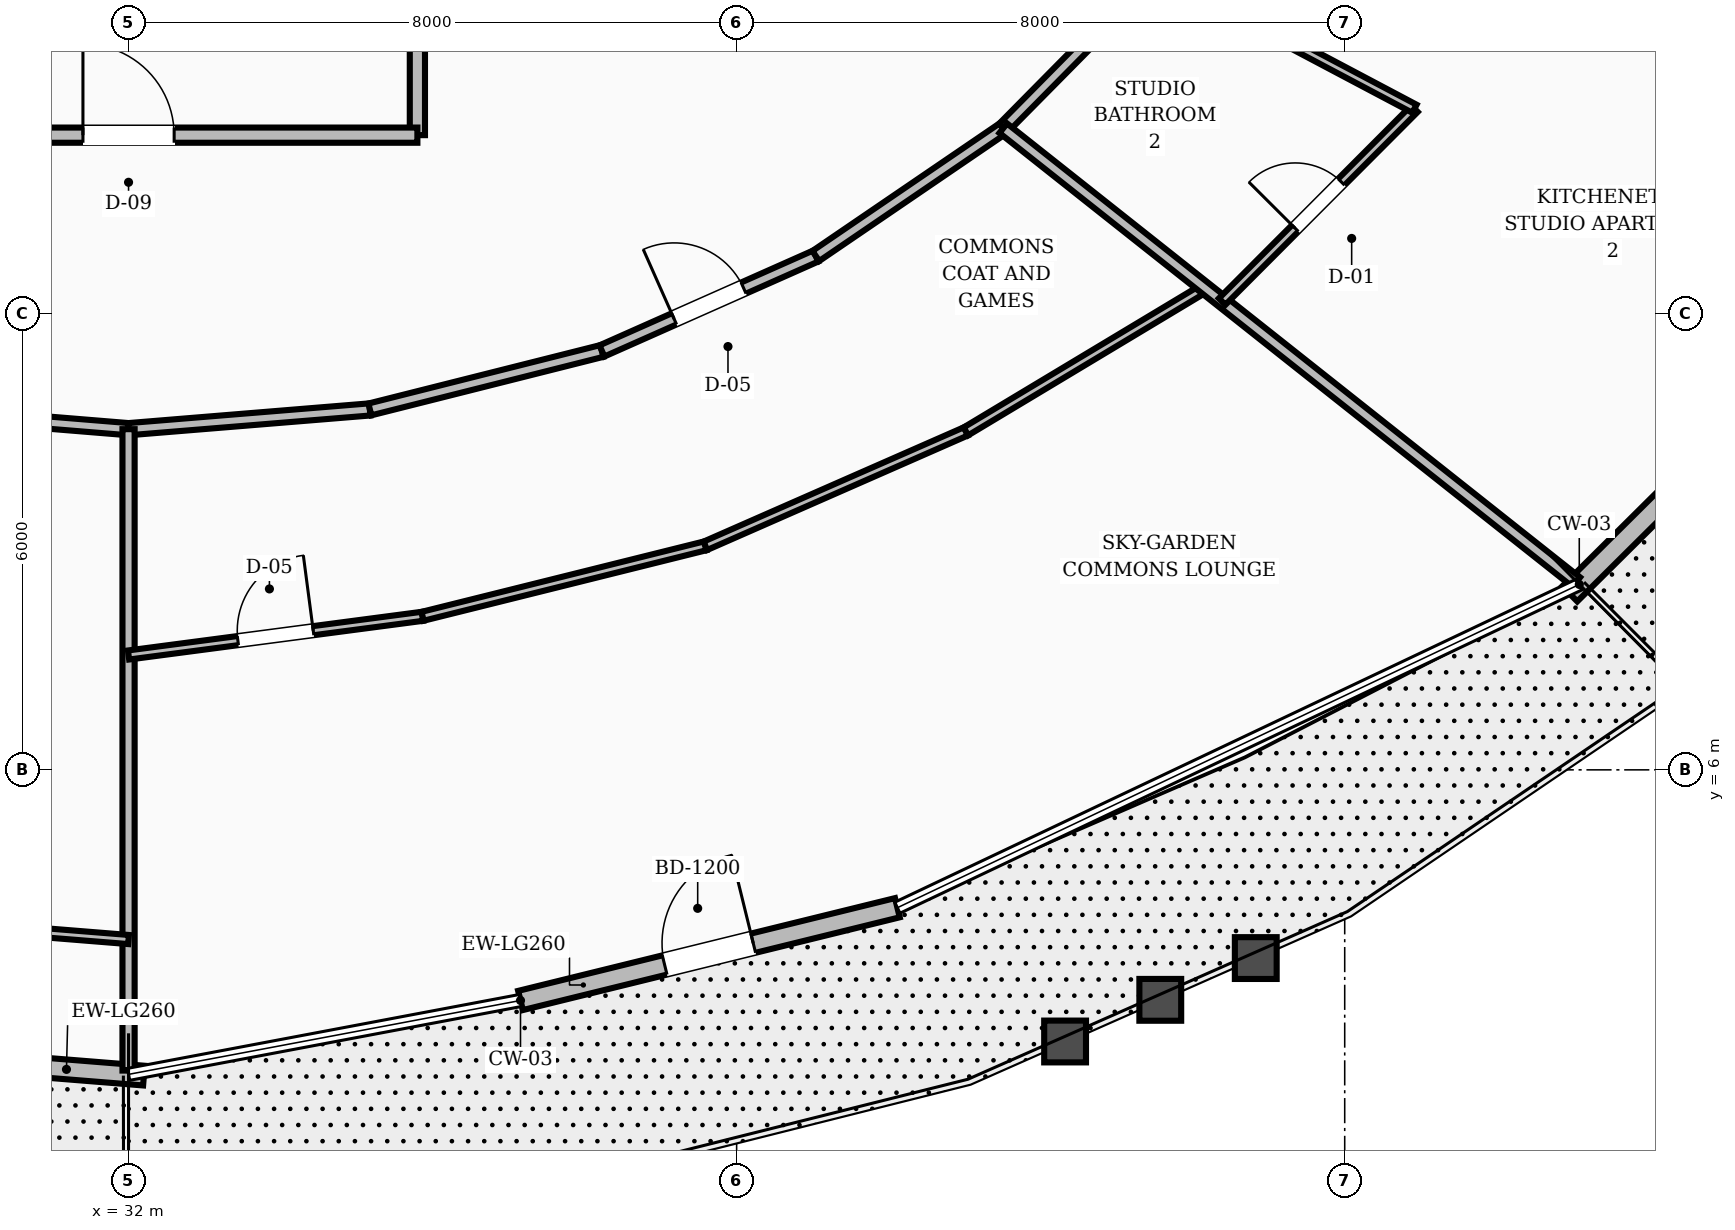
"""IFC4 building model, lengths in metres.
Left out: names, types, materials, properties, quantities, classifications, styles, units other than length and angle.
Written with IfcOpenShell. Run it as: python <this file> out.ifc"""

import sys

from ifc_helpers import new_model, si_unit, direction, frame, frame_2d, origin, place, context, subcontext, project, spatial, rectangle, extrude, element, fill, save


model = new_model("IFC4")
c1 = context("Model", 3, precision=1e-05, world=origin(), true_north=direction((0.0, 1.0)))
c2 = subcontext(c1, "Body", "Model", "MODEL_VIEW")
j1 = project(units=[si_unit("LENGTHUNIT", "METRE"), si_unit("PLANEANGLEUNIT", "RADIAN")], contexts=[c1])
p1 = place(None, origin())
s1 = spatial("IfcSite", under=j1, at=p1, CompositionType="ELEMENT")
p2 = place(p1, origin())
s2 = spatial("IfcBuilding", under=s1, at=p2, CompositionType="ELEMENT")
p3 = place(p2, frame((0.0, 0.0, 88.0)))
s3 = spatial("IfcBuildingStorey", under=s2, at=p3, CompositionType="ELEMENT", Elevation=88.0)
p4 = place(p3, frame((26.734, 2.417, 0.0), z_axis=(0.0, 0.0, 1.0), x_axis=(0.996792879397, -0.080024718573, 0.0)))
e1 = element("IfcWall", 1, at=p4, inside=s3, PredefinedType="STANDARD", context=c2, shape_type="SweptSolid", body=[
    extrude(rectangle(XDim=5.485, YDim=0.26, at=frame_2d((2.743, 0.0))), origin(), (0.0, 0.0, 1.0), 2.71),
])
p5 = place(p4, frame((2.091, 0.0, 0.0)))
e2 = element("IfcOpeningElement", 2, at=p5, cuts=e1, PredefinedType="OPENING", context=c2, shape_type="SweptSolid", body=[
    extrude(rectangle(XDim=1.1, YDim=2.15, at=frame_2d((0.55, 1.075))), frame((0.0, 0.14, 0.0), z_axis=(0.0, -1.0, 0.0), x_axis=(1.0, 0.0, 0.0)), (0.0, 0.0, 1.0), 0.28),
])
p6 = place(p3, frame((37.156, 2.966, 0.0), z_axis=(0.0, 0.0, 1.0), x_axis=(0.971019146569, 0.239001709192, 0.0)))
e3 = element("IfcWall", 3, at=p6, inside=s3, PredefinedType="STANDARD", context=c2, shape_type="SweptSolid", body=[
    extrude(rectangle(XDim=5.106, YDim=0.26, at=frame_2d((2.553, 0.0))), origin(), (0.0, 0.0, 1.0), 2.71),
])
p7 = place(p6, frame((1.953, 0.0, 0.0)))
e4 = element("IfcOpeningElement", 4, at=p7, cuts=e3, PredefinedType="OPENING", context=c2, shape_type="SweptSolid", body=[
    extrude(rectangle(XDim=1.2, YDim=2.15, at=frame_2d((0.6, 1.075))), frame((0.0, 0.14, 0.0), z_axis=(0.0, -1.0, 0.0), x_axis=(1.0, 0.0, 0.0)), (0.0, 0.0, 1.0), 0.28),
])
p8 = place(p3, frame((50.961, 8.315, 0.0), z_axis=(0.0, 0.0, 1.0), x_axis=(0.709441021492, 0.704764809724, 0.0)))
e5 = element("IfcWall", 5, at=p8, inside=s3, PredefinedType="STANDARD", context=c2, shape_type="SweptSolid", body=[
    extrude(rectangle(XDim=4.908, YDim=0.28, at=frame_2d((2.454, 0.0))), origin(), (0.0, 0.0, 1.0), 2.71),
])
p9 = place(p3, frame((35.8, 14.35, 0.0), z_axis=(0.0, 0.0, 1.0), x_axis=(0.0, 1.0, 0.0)))
e6 = element("IfcWall", 6, at=p9, inside=s3, PredefinedType="SOLIDWALL", context=c2, shape_type="SweptSolid", body=[
    extrude(rectangle(XDim=2.2, YDim=0.2, at=frame_2d((1.1, 0.0))), origin(), (0.0, 0.0, 1.0), 2.71),
])
p10 = place(p3, frame((28.2, 14.35, 0.0), z_axis=(0.0, 0.0, 1.0), x_axis=(1.0, 0.0, 0.0)))
e7 = element("IfcWall", 7, at=p10, inside=s3, PredefinedType="SOLIDWALL", context=c2, shape_type="SweptSolid", body=[
    extrude(rectangle(XDim=7.6, YDim=0.2, at=frame_2d((3.8, 0.0))), origin(), (0.0, 0.0, 1.0), 2.71),
])
p11 = place(p10, frame((3.2, 0.0, 0.0)))
e8 = element("IfcOpeningElement", 8, at=p11, cuts=e7, PredefinedType="OPENING", context=c2, shape_type="SweptSolid", body=[
    extrude(rectangle(XDim=1.2, YDim=2.1, at=frame_2d((0.6, 1.05))), frame((0.0, 0.11, 0.0), z_axis=(0.0, -1.0, 0.0), x_axis=(1.0, 0.0, 0.0)), (0.0, 0.0, 1.0), 0.22),
])
p12 = place(p3, frame((28.825, 10.742, 0.0), z_axis=(0.0, 0.0, 1.0), x_axis=(0.996669377538, -0.081548463373, 0.0)))
e9 = element("IfcWall", 9, at=p12, inside=s3, PredefinedType="SOLIDWALL", context=c2, shape_type="SweptSolid", body=[
    extrude(rectangle(XDim=3.185, YDim=0.16, at=frame_2d((1.593, 0.0))), origin(), (0.0, 0.0, 1.0), 2.71),
])
p13 = place(p12, frame((1.118, 0.0, 0.0)))
e10 = element("IfcOpeningElement", 10, at=p13, cuts=e9, PredefinedType="OPENING", context=c2, shape_type="SweptSolid", body=[
    extrude(rectangle(XDim=0.95, YDim=2.1, at=frame_2d((0.475, 1.05))), frame((0.0, 0.09, 0.0), z_axis=(0.0, -1.0, 0.0), x_axis=(1.0, 0.0, 0.0)), (0.0, 0.0, 1.0), 0.18),
])
p14 = place(p3, frame((32.0, 10.482, 0.0), z_axis=(0.0, 0.0, 1.0), x_axis=(0.996669377538, 0.081548463373, 0.0)))
e11 = element("IfcWall", 11, at=p14, inside=s3, PredefinedType="SOLIDWALL", context=c2, shape_type="SweptSolid", body=[
    extrude(rectangle(XDim=3.185, YDim=0.16, at=frame_2d((1.593, 0.0))), origin(), (0.0, 0.0, 1.0), 2.71),
])
p15 = place(p3, frame((35.175, 10.742, 0.0), z_axis=(0.0, 0.0, 1.0), x_axis=(0.969689238064, 0.244341526521, 0.0)))
e12 = element("IfcWall", 12, at=p15, inside=s3, PredefinedType="SOLIDWALL", context=c2, shape_type="SweptSolid", body=[
    extrude(rectangle(XDim=3.148, YDim=0.16, at=frame_2d((1.574, 0.0))), origin(), (0.0, 0.0, 1.0), 2.71),
])
p16 = place(p3, frame((38.228, 11.511, 0.0), z_axis=(0.0, 0.0, 1.0), x_axis=(0.913952123493, 0.405822024984, 0.0)))
e13 = element("IfcWall", 13, at=p16, inside=s3, PredefinedType="SOLIDWALL", context=c2, shape_type="SweptSolid", body=[
    extrude(rectangle(XDim=3.078, YDim=0.16, at=frame_2d((1.539, 0.0))), origin(), (0.0, 0.0, 1.0), 2.71),
])
p17 = place(p16, frame((1.039, 0.0, 0.0)))
e14 = element("IfcOpeningElement", 14, at=p17, cuts=e13, PredefinedType="OPENING", context=c2, shape_type="SweptSolid", body=[
    extrude(rectangle(XDim=1.0, YDim=2.1, at=frame_2d((0.5, 1.05))), frame((0.0, 0.09, 0.0), z_axis=(0.0, -1.0, 0.0), x_axis=(1.0, 0.0, 0.0)), (0.0, 0.0, 1.0), 0.18),
])
p18 = place(p3, frame((41.041, 12.76, 0.0), z_axis=(0.0, 0.0, 1.0), x_axis=(0.826293096206, 0.56324037423, 0.0)))
e15 = element("IfcWall", 15, at=p18, inside=s3, PredefinedType="SOLIDWALL", context=c2, shape_type="SweptSolid", body=[
    extrude(rectangle(XDim=2.985, YDim=0.16, at=frame_2d((1.492, 0.0))), origin(), (0.0, 0.0, 1.0), 2.71),
])
p19 = place(p3, frame((43.508, 14.441, 0.0), z_axis=(0.0, 0.0, 1.0), x_axis=(0.702811997, 0.711375636969, 0.0)))
e16 = element("IfcWall", 16, at=p19, inside=s3, PredefinedType="SOLIDWALL", context=c2, shape_type="SweptSolid", body=[
    extrude(rectangle(XDim=2.879, YDim=0.16, at=frame_2d((1.44, 0.0))), origin(), (0.0, 0.0, 1.0), 2.71),
])
p20 = place(p3, frame((32.0, 10.482, 0.0), z_axis=(0.0, 0.0, 1.0), x_axis=(0.0, -1.0, 0.0)))
e17 = element("IfcWall", 17, at=p20, inside=s3, PredefinedType="SOLIDWALL", context=c2, shape_type="SweptSolid", body=[
    extrude(rectangle(XDim=8.438, YDim=0.16, at=frame_2d((4.219, 0.0))), origin(), (0.0, 0.0, 1.0), 2.71),
])
p21 = place(p3, frame((32.0, 7.511, 0.0), z_axis=(0.0, 0.0, 1.0), x_axis=(0.991445135258, 0.130524111843, 0.0)))
e18 = element("IfcWall", 18, at=p21, inside=s3, PredefinedType="PARTITIONING", context=c2, shape_type="SweptSolid", body=[
    extrude(rectangle(XDim=3.902, YDim=0.12, at=frame_2d((1.951, 0.0))), origin(), (0.0, 0.0, 1.0), 2.71),
])
p22 = place(p21, frame((1.451, 0.0, 0.0)))
e19 = element("IfcOpeningElement", 19, at=p22, cuts=e18, PredefinedType="OPENING", context=c2, shape_type="SweptSolid", body=[
    extrude(rectangle(XDim=1.0, YDim=2.1, at=frame_2d((0.5, 1.05))), frame((0.0, 0.07, 0.0), z_axis=(0.0, -1.0, 0.0), x_axis=(1.0, 0.0, 0.0)), (0.0, 0.0, 1.0), 0.14),
])
p23 = place(p3, frame((35.868, 8.02, 0.0), z_axis=(0.0, 0.0, 1.0), x_axis=(0.970310833778, 0.241861294657, 0.0)))
e20 = element("IfcWall", 20, at=p23, inside=s3, PredefinedType="PARTITIONING", context=c2, shape_type="SweptSolid", body=[
    extrude(rectangle(XDim=3.834, YDim=0.12, at=frame_2d((1.917, 0.0))), origin(), (0.0, 0.0, 1.0), 2.71),
])
p24 = place(p3, frame((39.588, 8.948, 0.0), z_axis=(0.0, 0.0, 1.0), x_axis=(0.91561475849, 0.402056729871, 0.0)))
e21 = element("IfcWall", 21, at=p24, inside=s3, PredefinedType="PARTITIONING", context=c2, shape_type="SweptSolid", body=[
    extrude(rectangle(XDim=3.744, YDim=0.12, at=frame_2d((1.872, 0.0))), origin(), (0.0, 0.0, 1.0), 2.71),
])
p25 = place(p3, frame((43.017, 10.453, 0.0), z_axis=(0.0, 0.0, 1.0), x_axis=(0.857287225794, 0.514838433385, 0.0)))
e22 = element("IfcWall", 22, at=p25, inside=s3, PredefinedType="PARTITIONING", context=c2, shape_type="SweptSolid", body=[
    extrude(rectangle(XDim=3.667, YDim=0.12, at=frame_2d((1.833, 0.0))), origin(), (0.0, 0.0, 1.0), 2.71),
])
p26 = place(p3, frame((43.508, 14.441, 0.0), z_axis=(0.0, 0.0, 1.0), x_axis=(0.783915576776, -0.620867432298, 0.0)))
e23 = element("IfcWall", 23, at=p26, inside=s3, PredefinedType="SOLIDWALL", context=c2, shape_type="SweptSolid", body=[
    extrude(rectangle(XDim=9.617, YDim=0.16, at=frame_2d((4.809, 0.0))), origin(), (0.0, 0.0, 1.0), 2.71),
])
p27 = place(p3, frame((46.387, 12.16, 0.0), z_axis=(0.0, 0.0, 1.0), x_axis=(0.706152338319, 0.708059937496, 0.0)))
e24 = element("IfcWall", 24, at=p27, inside=s3, PredefinedType="PARTITIONING", context=c2, shape_type="SweptSolid", body=[
    extrude(rectangle(XDim=3.583, YDim=0.12, at=frame_2d((1.792, 0.0))), origin(), (0.0, 0.0, 1.0), 2.71),
])
p28 = place(p27, frame((1.362, 0.0, 0.0)))
e25 = element("IfcOpeningElement", 25, at=p28, cuts=e24, PredefinedType="OPENING", context=c2, shape_type="SweptSolid", body=[
    extrude(rectangle(XDim=0.86, YDim=2.1, at=frame_2d((0.43, 1.05))), frame((0.0, 0.07, 0.0), z_axis=(0.0, -1.0, 0.0), x_axis=(1.0, 0.0, 0.0)), (0.0, 0.0, 1.0), 0.14),
])
p29 = place(p3, frame((45.531, 16.49, 0.0), z_axis=(0.0, 0.0, 1.0), x_axis=(0.883879348267, -0.46771497486, 0.0)))
e26 = element("IfcWall", 26, at=p29, inside=s3, PredefinedType="PARTITIONING", context=c2, shape_type="SweptSolid", body=[
    extrude(rectangle(XDim=3.831, YDim=0.12, at=frame_2d((1.916, 0.0))), origin(), (0.0, 0.0, 1.0), 2.71),
])
p30 = place(p3, frame((27.171, 4.156, 0.0), z_axis=(0.0, 0.0, 1.0), x_axis=(0.996776382437, -0.080229940889, 0.0)))
e27 = element("IfcWall", 27, at=p30, inside=s3, PredefinedType="PARTITIONING", context=c2, shape_type="SweptSolid", body=[
    extrude(rectangle(XDim=4.844, YDim=0.12, at=frame_2d((2.422, 0.0))), origin(), (0.0, 0.0, 1.0), 2.71),
])
p31 = place(p7, origin())
e28 = element("IfcDoor", 28, at=p31, inside=s3, OperationType="SINGLE_SWING_RIGHT", PredefinedType="DOOR", context=c2, shape_type="SweptSolid", body=[
    extrude(rectangle(XDim=1.2, YDim=2.15, at=frame_2d((0.6, 1.075))), frame((0.0, 0.025, 0.0), z_axis=(0.0, -1.0, 0.0), x_axis=(1.0, 0.0, 0.0)), (0.0, 0.0, 1.0), 0.05),
])
fill(e4, e28)
p32 = place(p11, origin())
e29 = element("IfcDoor", 29, at=p32, inside=s3, OperationType="SINGLE_SWING_LEFT", PredefinedType="DOOR", context=c2, shape_type="SweptSolid", body=[
    extrude(rectangle(XDim=1.2, YDim=2.1, at=frame_2d((0.6, 1.05))), frame((0.0, 0.025, 0.0), z_axis=(0.0, -1.0, 0.0), x_axis=(1.0, 0.0, 0.0)), (0.0, 0.0, 1.0), 0.05),
])
fill(e8, e29)
p33 = place(p17, origin())
e30 = element("IfcDoor", 30, at=p33, inside=s3, OperationType="SINGLE_SWING_LEFT", PredefinedType="DOOR", context=c2, shape_type="SweptSolid", body=[
    extrude(rectangle(XDim=1.0, YDim=2.1, at=frame_2d((0.5, 1.05))), frame((0.0, 0.025, 0.0), z_axis=(0.0, -1.0, 0.0), x_axis=(1.0, 0.0, 0.0)), (0.0, 0.0, 1.0), 0.05),
])
fill(e14, e30)
p34 = place(p22, origin())
e31 = element("IfcDoor", 31, at=p34, inside=s3, OperationType="SINGLE_SWING_RIGHT", PredefinedType="DOOR", context=c2, shape_type="SweptSolid", body=[
    extrude(rectangle(XDim=1.0, YDim=2.1, at=frame_2d((0.5, 1.05))), frame((0.0, 0.025, 0.0), z_axis=(0.0, -1.0, 0.0), x_axis=(1.0, 0.0, 0.0)), (0.0, 0.0, 1.0), 0.05),
])
fill(e19, e31)
p35 = place(p28, origin())
e32 = element("IfcDoor", 32, at=p35, inside=s3, OperationType="SINGLE_SWING_LEFT", PredefinedType="DOOR", context=c2, shape_type="SweptSolid", body=[
    extrude(rectangle(XDim=0.86, YDim=2.1, at=frame_2d((0.43, 1.05))), frame((0.0, 0.025, 0.0), z_axis=(0.0, -1.0, 0.0), x_axis=(1.0, 0.0, 0.0)), (0.0, 0.0, 1.0), 0.05),
])
fill(e25, e32)
save(model, sys.argv[1])
